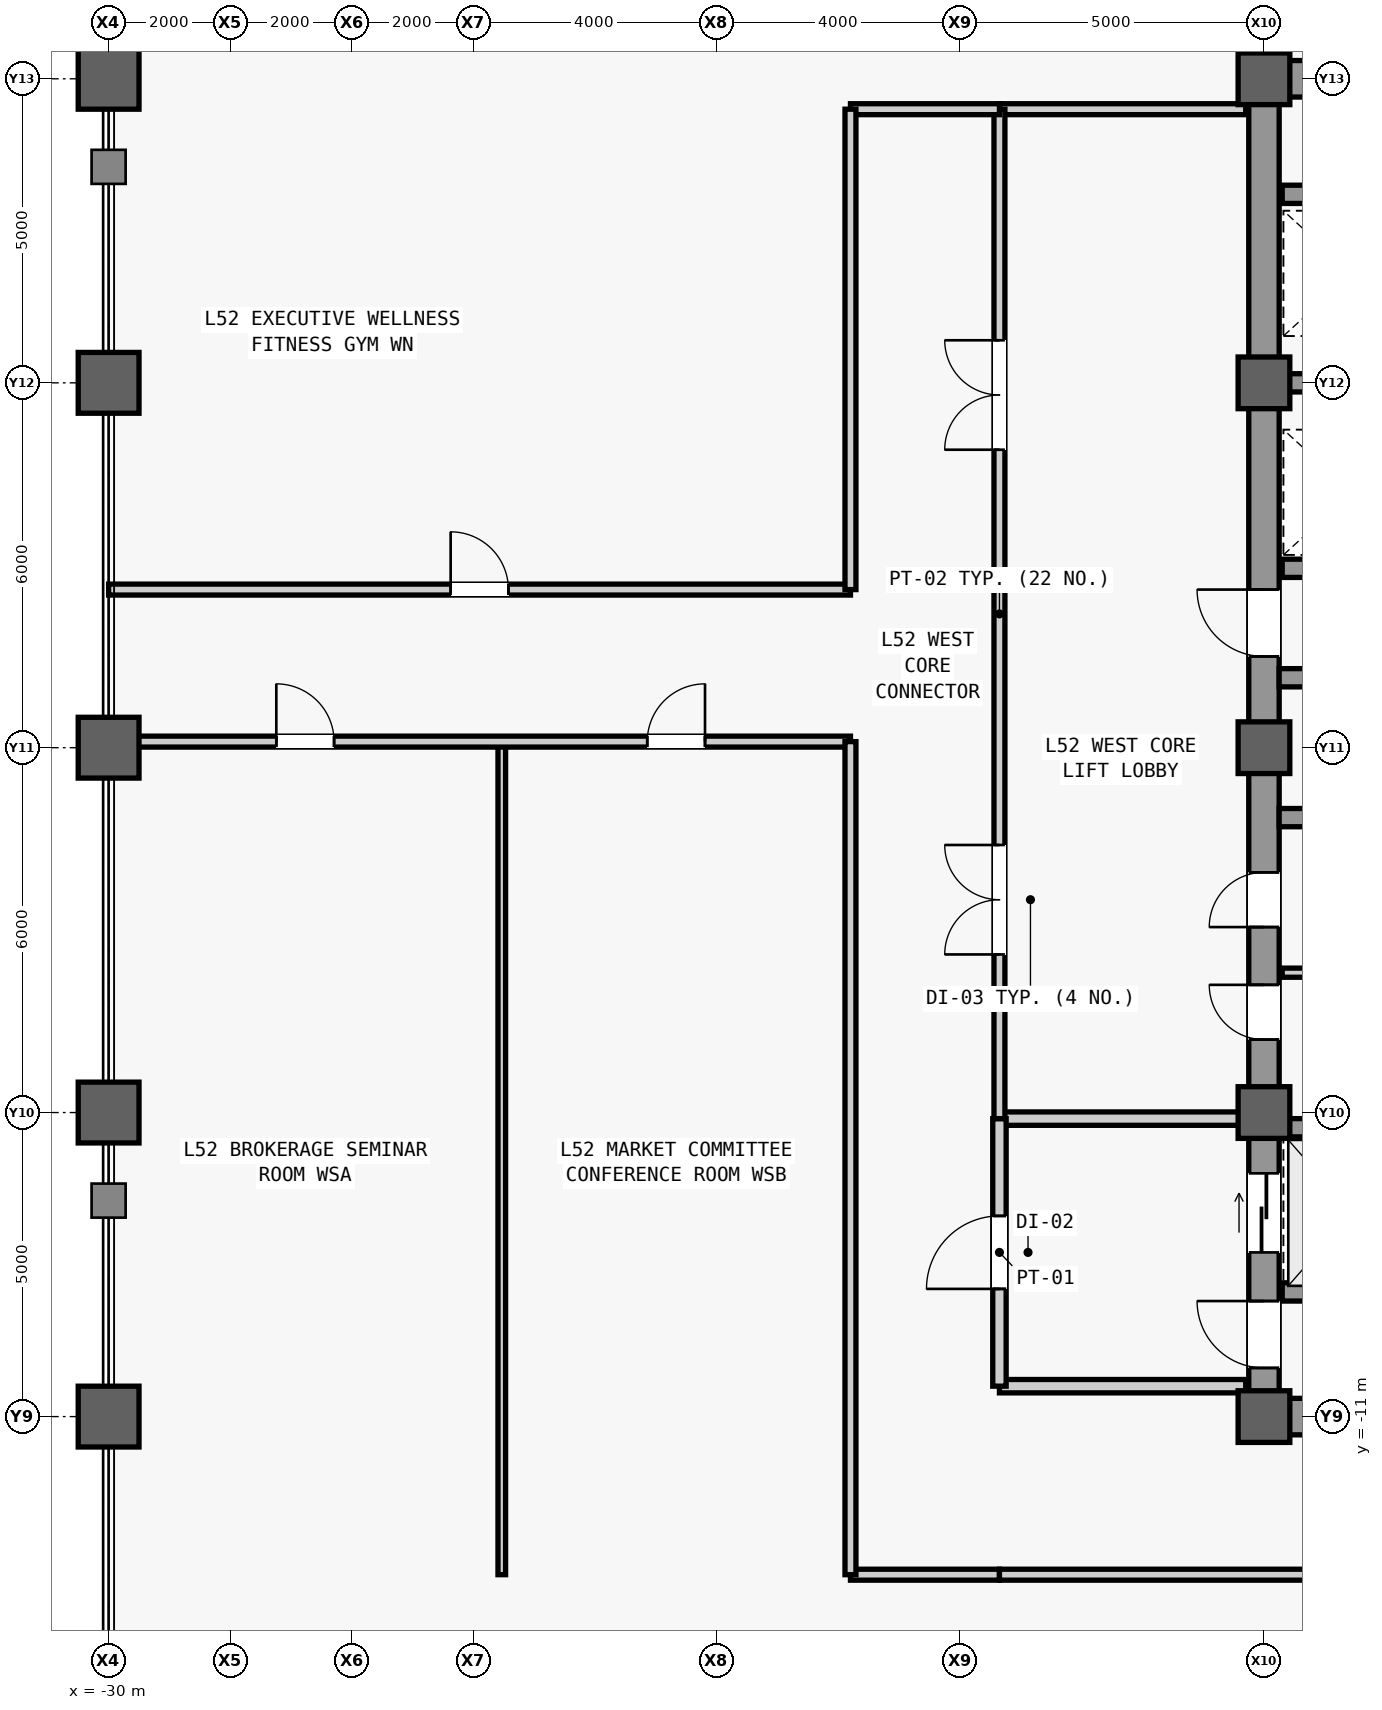
"""IFC4 building model, lengths in metres.
Left out: names, types, materials, properties, quantities, classifications, styles, units other than length and angle.
Written with IfcOpenShell. Run it as: python <this file> out.ifc"""

import sys

from ifc_helpers import new_model, si_unit, direction, frame, frame_2d, origin, origin_2d, place, context, subcontext, project, spatial, rectangle, hollow_rectangle, extrude, source, transform, mapped, element, fill, save


model = new_model("IFC4")
c1 = context("Model", 3, precision=1e-05, world=origin(), true_north=direction((0.0, 1.0)))
c2 = subcontext(c1, "Body", "Model", "MODEL_VIEW")
j1 = project(units=[si_unit("LENGTHUNIT", "METRE"), si_unit("PLANEANGLEUNIT", "RADIAN")], contexts=[c1])
p1 = place(None, origin())
s1 = spatial("IfcSite", under=j1, at=p1, CompositionType="ELEMENT")
p2 = place(p1, origin())
s2 = spatial("IfcBuilding", under=s1, at=p2, CompositionType="ELEMENT")
p3 = place(p2, frame((0.0, 0.0, 223.1)))
s3 = spatial("IfcBuildingStorey", under=s2, at=p3, CompositionType="ELEMENT", Elevation=223.1)
m1 = source(origin(), c2, "Body", "SweptSolid", [
    extrude(rectangle(XDim=22.0, YDim=0.5, at=frame_2d((11.0, 0.0))), origin(), (0.0, 0.0, 1.0), 3.78),
])
p4 = place(p3, frame((-11.0, -11.0, 0.0), z_axis=(0.0, 0.0, 1.0), x_axis=(0.0, 1.0, 0.0)))
e1 = element("IfcWall", 1, at=p4, inside=s3, PredefinedType="SHEAR", context=c2, shape_type="MappedRepresentation", body=[
    mapped(m1, transform((0.0, 0.0, 0.0), scale=1.0)),
])
m2 = source(origin(), c2, "Body", "SweptSolid", [
    extrude(rectangle(XDim=1.1, YDim=2.2, at=frame_2d((0.55, 1.1))), frame((0.0, 0.26, 0.0), z_axis=(0.0, -1.0, 0.0), x_axis=(1.0, 0.0, 0.0)), (0.0, 0.0, 1.0), 0.52),
])
p5 = place(p4, frame((0.8, 0.0, 0.0)))
e2 = element("IfcOpeningElement", 2, at=p5, cuts=e1, PredefinedType="OPENING", context=c2, shape_type="MappedRepresentation", body=[
    mapped(m2, transform((0.0, 0.0, 0.0), scale=1.0)),
])
p6 = place(p4, frame((12.5, 0.0, 0.0)))
e3 = element("IfcOpeningElement", 3, at=p6, cuts=e1, PredefinedType="OPENING", context=c2, shape_type="MappedRepresentation", body=[
    mapped(m2, transform((0.0, 0.0, 0.0), scale=1.0)),
])
m3 = source(origin(), c2, "Body", "SweptSolid", [
    extrude(rectangle(XDim=0.9, YDim=2.15, at=frame_2d((0.45, 1.075))), frame((0.0, 0.26, 0.0), z_axis=(0.0, -1.0, 0.0), x_axis=(1.0, 0.0, 0.0)), (0.0, 0.0, 1.0), 0.52),
])
p7 = place(p4, frame((6.2, 0.0, 0.0)))
e4 = element("IfcOpeningElement", 4, at=p7, cuts=e1, PredefinedType="OPENING", context=c2, shape_type="MappedRepresentation", body=[
    mapped(m3, transform((0.0, 0.0, 0.0), scale=1.0)),
])
p8 = place(p4, frame((8.05, 0.0, 0.0)))
e5 = element("IfcOpeningElement", 5, at=p8, cuts=e1, PredefinedType="OPENING", context=c2, shape_type="MappedRepresentation", body=[
    mapped(m3, transform((0.0, 0.0, 0.0), scale=1.0)),
])
m4 = source(origin(), c2, "Body", "SweptSolid", [
    extrude(rectangle(XDim=1.3, YDim=2.3, at=frame_2d((0.65, 1.15))), frame((0.0, 0.26, 0.0), z_axis=(0.0, -1.0, 0.0), x_axis=(1.0, 0.0, 0.0)), (0.0, 0.0, 1.0), 0.52),
])
p9 = place(p4, frame((2.7, 0.0, 0.0)))
e6 = element("IfcOpeningElement", 6, at=p9, cuts=e1, PredefinedType="OPENING", context=c2, shape_type="MappedRepresentation", body=[
    mapped(m4, transform((0.0, 0.0, 0.0), scale=1.0)),
])
m5 = source(origin(), c2, "Body", "SweptSolid", [
    extrude(rectangle(XDim=5.9, YDim=0.6, at=frame_2d((2.95, 0.0))), origin(), (0.0, 0.0, 1.0), 3.78),
])
for number, where, z_axis, x_axis in (
    (7, (-10.75, -11.0, 0.0), (0.0, 0.0, 1.0), (1.0, 0.0, 0.0)),
    (8, (-10.75, 11.0, 0.0), (0.0, 0.0, 1.0), (1.0, 0.0, 0.0)),
):
    element("IfcWall", number, at=place(p3, frame(where, z_axis=z_axis, x_axis=x_axis)), inside=s3, PredefinedType="SHEAR", context=c2, shape_type="MappedRepresentation", body=[
        mapped(m5, transform((0.0, 0.0, 0.0), scale=1.0)),
    ])
m6 = source(origin(), c2, "Body", "SweptSolid", [
    extrude(rectangle(XDim=5.65, YDim=0.3, at=frame_2d((2.825, 0.0))), origin(), (0.0, 0.0, 1.0), 3.78),
])
for number, where, z_axis, x_axis in (
    (9, (-10.75, -1.15, 0.0), (0.0, 0.0, 1.0), (1.0, 0.0, 0.0)),
    (10, (-10.75, 1.15, 0.0), (0.0, 0.0, 1.0), (1.0, 0.0, 0.0)),
):
    element("IfcWall", number, at=place(p3, frame(where, z_axis=z_axis, x_axis=x_axis)), inside=s3, PredefinedType="SHEAR", context=c2, shape_type="MappedRepresentation", body=[
        mapped(m6, transform((0.0, 0.0, 0.0), scale=1.0)),
    ])
m7 = source(origin(), c2, "Body", "SweptSolid", [
    extrude(hollow_rectangle(XDim=1.0, YDim=1.0, WallThickness=0.055, at=origin_2d()), origin(), (0.0, 0.0, 1.0), 4.0),
])
for number, where, z_axis, x_axis in (
    (11, (-30.0, -11.0, 0.0), (0.0, 0.0, 1.0), (1.0, 0.0, 0.0)),
    (12, (-30.0, -6.0, 0.0), (0.0, 0.0, 1.0), (1.0, 0.0, 0.0)),
    (13, (-30.0, 0.0, 0.0), (0.0, 0.0, 1.0), (1.0, 0.0, 0.0)),
    (14, (-30.0, 6.0, 0.0), (0.0, 0.0, 1.0), (1.0, 0.0, 0.0)),
    (15, (-30.0, 11.0, 0.0), (0.0, 0.0, 1.0), (1.0, 0.0, 0.0)),
):
    element("IfcColumn", number, at=place(p3, frame(where, z_axis=z_axis, x_axis=x_axis)), inside=s3, PredefinedType="COLUMN", context=c2, shape_type="MappedRepresentation", body=[
        mapped(m7, transform((0.0, 0.0, 0.0), scale=1.0)),
    ])
m8 = source(origin(), c2, "Body", "SweptSolid", [
    extrude(rectangle(XDim=0.85, YDim=0.85, at=origin_2d()), origin(), (0.0, 0.0, 1.0), 4.0),
])
for number, where, z_axis, x_axis in (
    (16, (-11.0, -11.0, 0.0), (0.0, 0.0, 1.0), (1.0, 0.0, 0.0)),
    (17, (-11.0, -6.0, 0.0), (0.0, 0.0, 1.0), (1.0, 0.0, 0.0)),
    (18, (-11.0, 0.0, 0.0), (0.0, 0.0, 1.0), (1.0, 0.0, 0.0)),
    (19, (-11.0, 6.0, 0.0), (0.0, 0.0, 1.0), (1.0, 0.0, 0.0)),
    (20, (-11.0, 11.0, 0.0), (0.0, 0.0, 1.0), (1.0, 0.0, 0.0)),
):
    element("IfcColumn", number, at=place(p3, frame(where, z_axis=z_axis, x_axis=x_axis)), inside=s3, PredefinedType="COLUMN", context=c2, shape_type="MappedRepresentation", body=[
        mapped(m8, transform((0.0, 0.0, 0.0), scale=1.0)),
    ])
m9 = source(origin(), c2, "Body", "SweptSolid", [
    extrude(rectangle(XDim=2.2, YDim=0.3, at=frame_2d((1.1, 0.0))), origin(), (0.0, 0.0, 1.0), 3.78),
])
for number, where, z_axis, x_axis in (
    (21, (-10.7, -8.95, 0.0), (0.0, 0.0, 1.0), (1.0, 0.0, 0.0)),
    (22, (-10.7, -6.25, 0.0), (0.0, 0.0, 1.0), (1.0, 0.0, 0.0)),
    (23, (-10.7, 2.95, 0.0), (0.0, 0.0, 1.0), (1.0, 0.0, 0.0)),
    (24, (-10.7, 6.0, 0.0), (0.0, 0.0, 1.0), (1.0, 0.0, 0.0)),
    (25, (-10.7, 9.1, 0.0), (0.0, 0.0, 1.0), (1.0, 0.0, 0.0)),
):
    element("IfcWall", number, at=place(p3, frame(where, z_axis=z_axis, x_axis=x_axis)), inside=s3, PredefinedType="SHEAR", context=c2, shape_type="MappedRepresentation", body=[
        mapped(m9, transform((0.0, 0.0, 0.0), scale=1.0)),
    ])
m10 = source(origin(), c2, "Body", "SweptSolid", [
    extrude(rectangle(XDim=2.05, YDim=0.15, at=frame_2d((1.025, 0.0))), origin(), (0.0, 0.0, 1.0), 3.78),
])
p10 = place(p3, frame((-10.7, -3.7, 0.0), z_axis=(0.0, 0.0, 1.0), x_axis=(1.0, 0.0, 0.0)))
e26 = element("IfcWall", 26, at=p10, inside=s3, PredefinedType="PARTITIONING", context=c2, shape_type="MappedRepresentation", body=[
    mapped(m10, transform((0.0, 0.0, 0.0), scale=1.0)),
])
m11 = source(origin(), c2, "Body", "SweptSolid", [
    extrude(rectangle(XDim=4.05, YDim=0.22, at=frame_2d((2.025, 0.0))), origin(), (0.0, 0.0, 1.0), 3.78),
])
p11 = place(p3, frame((-15.35, -10.5, 0.0), z_axis=(0.0, 0.0, 1.0), x_axis=(1.0, 0.0, 0.0)))
e27 = element("IfcWall", 27, at=p11, inside=s3, PredefinedType="PARTITIONING", context=c2, shape_type="MappedRepresentation", body=[
    mapped(m11, transform((0.0, 0.0, 0.0), scale=1.0)),
])
m12 = source(origin(), c2, "Body", "SweptSolid", [
    extrude(rectangle(XDim=4.05, YDim=0.22, at=frame_2d((2.025, 0.0))), origin(), (0.0, 0.0, 1.0), 3.085),
])
p12 = place(p3, frame((-15.35, -6.1, 0.0), z_axis=(0.0, 0.0, 1.0), x_axis=(1.0, 0.0, 0.0)))
e28 = element("IfcWall", 28, at=p12, inside=s3, PredefinedType="PARTITIONING", context=c2, shape_type="MappedRepresentation", body=[
    mapped(m12, transform((0.0, 0.0, 0.0), scale=1.0)),
])
m13 = source(origin(), c2, "Body", "SweptSolid", [
    extrude(rectangle(XDim=4.4, YDim=0.22, at=frame_2d((2.2, 0.0))), origin(), (0.0, 0.0, 1.0), 3.78),
])
p13 = place(p3, frame((-15.35, -10.5, 0.0), z_axis=(0.0, 0.0, 1.0), x_axis=(0.0, 1.0, 0.0)))
e29 = element("IfcWall", 29, at=p13, inside=s3, PredefinedType="PARTITIONING", context=c2, shape_type="MappedRepresentation", body=[
    mapped(m13, transform((0.0, 0.0, 0.0), scale=1.0)),
])
m14 = source(origin(), c2, "Body", "SweptSolid", [
    extrude(rectangle(XDim=1.2, YDim=2.2, at=frame_2d((0.6, 1.1))), frame((0.0, 0.12, 0.0), z_axis=(0.0, -1.0, 0.0), x_axis=(1.0, 0.0, 0.0)), (0.0, 0.0, 1.0), 0.24),
])
p14 = place(p13, frame((1.6, 0.0, 0.0)))
e30 = element("IfcOpeningElement", 30, at=p14, cuts=e29, PredefinedType="OPENING", context=c2, shape_type="MappedRepresentation", body=[
    mapped(m14, transform((0.0, 0.0, 0.0), scale=1.0)),
])
m15 = source(origin(), c2, "Body", "SweptSolid", [
    extrude(rectangle(XDim=4.05, YDim=0.18, at=frame_2d((2.025, 0.0))), origin(), (0.0, 0.0, 1.0), 3.78),
])
p15 = place(p3, frame((-15.35, 10.5, 0.0), z_axis=(0.0, 0.0, 1.0), x_axis=(1.0, 0.0, 0.0)))
e31 = element("IfcWall", 31, at=p15, inside=s3, PredefinedType="PARTITIONING", context=c2, shape_type="MappedRepresentation", body=[
    mapped(m15, transform((0.0, 0.0, 0.0), scale=1.0)),
])
m16 = source(origin(), c2, "Body", "SweptSolid", [
    extrude(rectangle(XDim=16.6, YDim=0.18, at=frame_2d((8.3, 0.0))), origin(), (0.0, 0.0, 1.0), 3.78),
])
p16 = place(p3, frame((-15.35, -6.1, 0.0), z_axis=(0.0, 0.0, 1.0), x_axis=(0.0, 1.0, 0.0)))
e32 = element("IfcWall", 32, at=p16, inside=s3, PredefinedType="PARTITIONING", context=c2, shape_type="MappedRepresentation", body=[
    mapped(m16, transform((0.0, 0.0, 0.0), scale=1.0)),
])
m17 = source(origin(), c2, "Body", "SweptSolid", [
    extrude(rectangle(XDim=1.8, YDim=2.25, at=frame_2d((0.9, 1.125))), frame((0.0, 0.1, 0.0), z_axis=(0.0, -1.0, 0.0), x_axis=(1.0, 0.0, 0.0)), (0.0, 0.0, 1.0), 0.2),
])
p17 = place(p16, frame((2.7, 0.0, 0.0)))
e33 = element("IfcOpeningElement", 33, at=p17, cuts=e32, PredefinedType="OPENING", context=c2, shape_type="MappedRepresentation", body=[
    mapped(m17, transform((0.0, 0.0, 0.0), scale=1.0)),
])
p18 = place(p16, frame((11.0, 0.0, 0.0)))
e34 = element("IfcOpeningElement", 34, at=p18, cuts=e32, PredefinedType="OPENING", context=c2, shape_type="MappedRepresentation", body=[
    mapped(m17, transform((0.0, 0.0, 0.0), scale=1.0)),
])
m18 = source(origin(), c2, "Body", "SweptSolid", [
    extrude(rectangle(XDim=2.45, YDim=0.18, at=frame_2d((1.225, 0.0))), origin(), (0.0, 0.0, 1.0), 3.78),
])
for number, where, z_axis, x_axis in (
    (35, (-17.8, 10.5, 0.0), (0.0, 0.0, 1.0), (1.0, 0.0, 0.0)),
    (36, (-17.8, -13.6, 0.0), (0.0, 0.0, 1.0), (1.0, 0.0, 0.0)),
):
    element("IfcWall", number, at=place(p3, frame(where, z_axis=z_axis, x_axis=x_axis)), inside=s3, PredefinedType="PARTITIONING", context=c2, shape_type="MappedRepresentation", body=[
        mapped(m18, transform((0.0, 0.0, 0.0), scale=1.0)),
    ])
m19 = source(origin(), c2, "Body", "SweptSolid", [
    extrude(rectangle(XDim=20.35, YDim=0.18, at=frame_2d((10.175, 0.0))), origin(), (0.0, 0.0, 1.0), 3.78),
])
p19 = place(p3, frame((-15.35, -13.6, 0.0), z_axis=(0.0, 0.0, 1.0), x_axis=(1.0, 0.0, 0.0)))
e37 = element("IfcWall", 37, at=p19, inside=s3, PredefinedType="PARTITIONING", context=c2, shape_type="MappedRepresentation", body=[
    mapped(m19, transform((0.0, 0.0, 0.0), scale=1.0)),
])
m20 = source(origin(), c2, "Body", "SweptSolid", [
    extrude(rectangle(XDim=13.7, YDim=0.125, at=frame_2d((6.85, 0.0))), origin(), (0.0, 0.0, 1.0), 3.78),
])
p20 = place(p3, frame((-23.534, -13.6, 0.0), z_axis=(0.0, 0.0, 1.0), x_axis=(0.0, 1.0, 0.0)))
e38 = element("IfcWall", 38, at=p20, inside=s3, PredefinedType="PARTITIONING", context=c2, shape_type="MappedRepresentation", body=[
    mapped(m20, transform((0.0, 0.0, 0.0), scale=1.0)),
])
m21 = source(origin(), c2, "Body", "SweptSolid", [
    extrude(rectangle(XDim=12.2, YDim=0.18, at=frame_2d((6.1, 0.0))), origin(), (0.0, 0.0, 1.0), 3.085),
])
p21 = place(p3, frame((-30.0, 0.1, 0.0), z_axis=(0.0, 0.0, 1.0), x_axis=(1.0, 0.0, 0.0)))
e39 = element("IfcWall", 39, at=p21, inside=s3, PredefinedType="PARTITIONING", context=c2, shape_type="MappedRepresentation", body=[
    mapped(m21, transform((0.0, 0.0, 0.0), scale=1.0)),
])
m22 = source(origin(), c2, "Body", "SweptSolid", [
    extrude(rectangle(XDim=0.95, YDim=2.15, at=frame_2d((0.475, 1.075))), frame((0.0, 0.1, 0.0), z_axis=(0.0, -1.0, 0.0), x_axis=(1.0, 0.0, 0.0)), (0.0, 0.0, 1.0), 0.2),
])
p22 = place(p21, frame((2.758, 0.0, 0.0)))
e40 = element("IfcOpeningElement", 40, at=p22, cuts=e39, PredefinedType="OPENING", context=c2, shape_type="MappedRepresentation", body=[
    mapped(m22, transform((0.0, 0.0, 0.0), scale=1.0)),
])
p23 = place(p21, frame((8.858, 0.0, 0.0)))
e41 = element("IfcOpeningElement", 41, at=p23, cuts=e39, PredefinedType="OPENING", context=c2, shape_type="MappedRepresentation", body=[
    mapped(m22, transform((0.0, 0.0, 0.0), scale=1.0)),
])
m23 = source(origin(), c2, "Body", "SweptSolid", [
    extrude(rectangle(XDim=13.7, YDim=0.18, at=frame_2d((6.85, 0.0))), origin(), (0.0, 0.0, 1.0), 3.78),
])
p24 = place(p3, frame((-17.8, -13.6, 0.0), z_axis=(0.0, 0.0, 1.0), x_axis=(0.0, 1.0, 0.0)))
e42 = element("IfcWall", 42, at=p24, inside=s3, PredefinedType="PARTITIONING", context=c2, shape_type="MappedRepresentation", body=[
    mapped(m23, transform((0.0, 0.0, 0.0), scale=1.0)),
])
m24 = source(origin(), c2, "Body", "SweptSolid", [
    extrude(rectangle(XDim=12.2, YDim=0.18, at=frame_2d((6.1, 0.0))), origin(), (0.0, 0.0, 1.0), 3.78),
])
p25 = place(p3, frame((-30.0, 2.6, 0.0), z_axis=(0.0, 0.0, 1.0), x_axis=(1.0, 0.0, 0.0)))
e43 = element("IfcWall", 43, at=p25, inside=s3, PredefinedType="PARTITIONING", context=c2, shape_type="MappedRepresentation", body=[
    mapped(m24, transform((0.0, 0.0, 0.0), scale=1.0)),
])
p26 = place(p25, frame((5.625, 0.0, 0.0)))
e44 = element("IfcOpeningElement", 44, at=p26, cuts=e43, PredefinedType="OPENING", context=c2, shape_type="MappedRepresentation", body=[
    mapped(m22, transform((0.0, 0.0, 0.0), scale=1.0)),
])
m25 = source(origin(), c2, "Body", "SweptSolid", [
    extrude(rectangle(XDim=7.9, YDim=0.18, at=frame_2d((3.95, 0.0))), origin(), (0.0, 0.0, 1.0), 3.78),
])
p27 = place(p3, frame((-17.8, 2.6, 0.0), z_axis=(0.0, 0.0, 1.0), x_axis=(0.0, 1.0, 0.0)))
e45 = element("IfcWall", 45, at=p27, inside=s3, PredefinedType="PARTITIONING", context=c2, shape_type="MappedRepresentation", body=[
    mapped(m25, transform((0.0, 0.0, 0.0), scale=1.0)),
])
m26 = source(origin(), c2, "Body", "SweptSolid", [
    extrude(rectangle(XDim=1.1, YDim=2.2, at=frame_2d((0.55, 1.1))), frame((0.0, 0.025, 0.0), z_axis=(0.0, -1.0, 0.0), x_axis=(1.0, 0.0, 0.0)), (0.0, 0.0, 1.0), 0.05),
])
p28 = place(p5, origin())
e46 = element("IfcDoor", 46, at=p28, inside=s3, OperationType="SINGLE_SWING_RIGHT", PredefinedType="DOOR", context=c2, shape_type="MappedRepresentation", body=[
    mapped(m26, transform((0.0, 0.0, 0.0), scale=1.0)),
])
fill(e2, e46)
p29 = place(p6, origin())
e47 = element("IfcDoor", 47, at=p29, inside=s3, OperationType="SINGLE_SWING_RIGHT", PredefinedType="DOOR", context=c2, shape_type="MappedRepresentation", body=[
    mapped(m26, transform((0.0, 0.0, 0.0), scale=1.0)),
])
fill(e3, e47)
m27 = source(origin(), c2, "Body", "SweptSolid", [
    extrude(rectangle(XDim=0.9, YDim=2.15, at=frame_2d((0.45, 1.075))), frame((0.0, 0.025, 0.0), z_axis=(0.0, -1.0, 0.0), x_axis=(1.0, 0.0, 0.0)), (0.0, 0.0, 1.0), 0.05),
])
p30 = place(p7, origin())
e48 = element("IfcDoor", 48, at=p30, inside=s3, OperationType="SINGLE_SWING_RIGHT", PredefinedType="DOOR", context=c2, shape_type="MappedRepresentation", body=[
    mapped(m27, transform((0.0, 0.0, 0.0), scale=1.0)),
])
fill(e4, e48)
p31 = place(p8, origin())
e49 = element("IfcDoor", 49, at=p31, inside=s3, OperationType="SINGLE_SWING_LEFT", PredefinedType="DOOR", context=c2, shape_type="MappedRepresentation", body=[
    mapped(m27, transform((0.0, 0.0, 0.0), scale=1.0)),
])
fill(e5, e49)
m28 = source(origin(), c2, "Body", "SweptSolid", [
    extrude(rectangle(XDim=1.2, YDim=2.2, at=frame_2d((0.6, 1.1))), frame((0.0, 0.025, 0.0), z_axis=(0.0, -1.0, 0.0), x_axis=(1.0, 0.0, 0.0)), (0.0, 0.0, 1.0), 0.05),
])
p32 = place(p14, origin())
e50 = element("IfcDoor", 50, at=p32, inside=s3, OperationType="SINGLE_SWING_LEFT", PredefinedType="DOOR", context=c2, shape_type="MappedRepresentation", body=[
    mapped(m28, transform((0.0, 0.0, 0.0), scale=1.0)),
])
fill(e30, e50)
m29 = source(origin(), c2, "Body", "SweptSolid", [
    extrude(rectangle(XDim=1.8, YDim=2.25, at=frame_2d((0.9, 1.125))), frame((0.0, 0.025, 0.0), z_axis=(0.0, -1.0, 0.0), x_axis=(1.0, 0.0, 0.0)), (0.0, 0.0, 1.0), 0.05),
])
p33 = place(p17, origin())
e51 = element("IfcDoor", 51, at=p33, inside=s3, OperationType="SINGLE_SWING_LEFT", PredefinedType="DOOR", context=c2, shape_type="MappedRepresentation", body=[
    mapped(m29, transform((0.0, 0.0, 0.0), scale=1.0)),
])
fill(e33, e51)
p34 = place(p18, origin())
e52 = element("IfcDoor", 52, at=p34, inside=s3, OperationType="SINGLE_SWING_RIGHT", PredefinedType="DOOR", context=c2, shape_type="MappedRepresentation", body=[
    mapped(m29, transform((0.0, 0.0, 0.0), scale=1.0)),
])
fill(e34, e52)
m30 = source(origin(), c2, "Body", "SweptSolid", [
    extrude(rectangle(XDim=0.95, YDim=2.15, at=frame_2d((0.475, 1.075))), frame((0.0, 0.025, 0.0), z_axis=(0.0, -1.0, 0.0), x_axis=(1.0, 0.0, 0.0)), (0.0, 0.0, 1.0), 0.05),
])
p35 = place(p22, origin())
e53 = element("IfcDoor", 53, at=p35, inside=s3, OperationType="SINGLE_SWING_LEFT", PredefinedType="DOOR", context=c2, shape_type="MappedRepresentation", body=[
    mapped(m30, transform((0.0, 0.0, 0.0), scale=1.0)),
])
fill(e40, e53)
p36 = place(p23, origin())
e54 = element("IfcDoor", 54, at=p36, inside=s3, OperationType="SINGLE_SWING_RIGHT", PredefinedType="DOOR", context=c2, shape_type="MappedRepresentation", body=[
    mapped(m30, transform((0.0, 0.0, 0.0), scale=1.0)),
])
fill(e41, e54)
p37 = place(p26, origin())
e55 = element("IfcDoor", 55, at=p37, inside=s3, OperationType="SINGLE_SWING_LEFT", PredefinedType="DOOR", context=c2, shape_type="MappedRepresentation", body=[
    mapped(m30, transform((0.0, 0.0, 0.0), scale=1.0)),
])
fill(e44, e55)
m31 = source(origin(), c2, "Body", "SweptSolid", [
    extrude(rectangle(XDim=1.3, YDim=2.3, at=frame_2d((0.65, 1.15))), frame((0.0, 0.025, 0.0), z_axis=(0.0, -1.0, 0.0), x_axis=(1.0, 0.0, 0.0)), (0.0, 0.0, 1.0), 0.05),
])
p38 = place(p9, origin())
e56 = element("IfcDoor", 56, at=p38, inside=s3, OperationType="SLIDING_TO_LEFT", PredefinedType="DOOR", context=c2, shape_type="MappedRepresentation", body=[
    mapped(m31, transform((0.0, 0.0, 0.0), scale=1.0)),
])
fill(e6, e56)
save(model, sys.argv[1])
